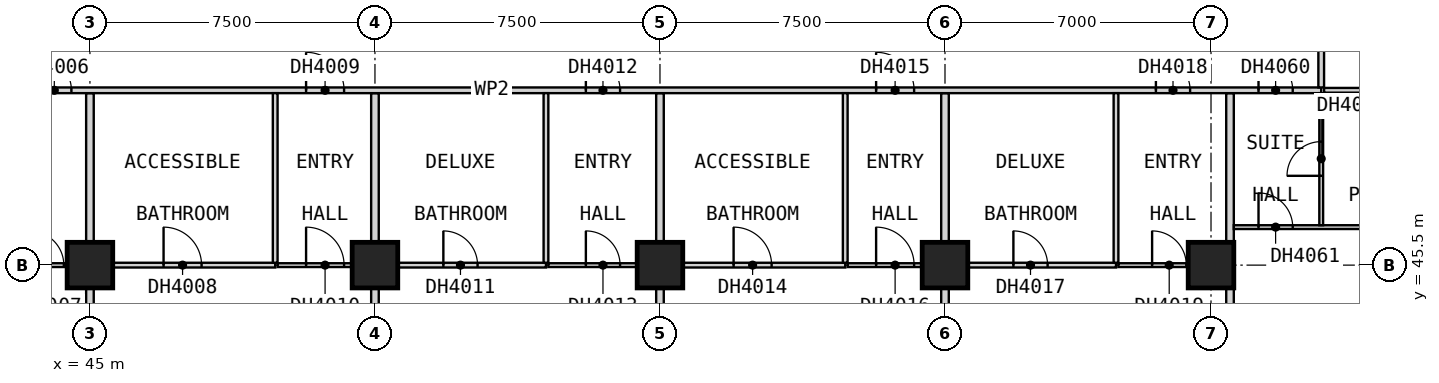
"""IFC4 building model, lengths in metres.
Left out: names, types, materials, properties, quantities, classifications, styles, units other than length and angle.
Written with IfcOpenShell. Run it as: python <this file> out.ifc"""

import sys

from ifc_helpers import new_model, si_unit, direction, frame, frame_2d, origin, origin_2d, place, context, subcontext, project, spatial, rectangle, extrude, element, fill, save


model = new_model("IFC4")
c1 = context("Model", 3, precision=1e-05, world=origin(), true_north=direction((0.0, 1.0)))
c2 = subcontext(c1, "Body", "Model", "MODEL_VIEW")
j1 = project(units=[si_unit("LENGTHUNIT", "METRE"), si_unit("PLANEANGLEUNIT", "RADIAN")], contexts=[c1])
p1 = place(None, origin())
s1 = spatial("IfcSite", under=j1, at=p1, CompositionType="ELEMENT")
p2 = place(p1, origin())
s2 = spatial("IfcBuilding", under=s1, at=p2, CompositionType="ELEMENT")
p3 = place(p2, frame((0.0, 0.0, 44.8)))
s3 = spatial("IfcBuildingStorey", under=s2, at=p3, CompositionType="ELEMENT", Elevation=44.8)
for number, where, z_axis, x_axis in (
    (1, (45.0, 45.5, 0.0), (0.0, 0.0, 1.0), (1.0, 0.0, 0.0)),
    (2, (52.5, 45.5, 0.0), (0.0, 0.0, 1.0), (1.0, 0.0, 0.0)),
    (3, (60.0, 45.5, 0.0), (0.0, 0.0, 1.0), (1.0, 0.0, 0.0)),
    (4, (67.5, 45.5, 0.0), (0.0, 0.0, 1.0), (1.0, 0.0, 0.0)),
    (5, (74.5, 45.5, 0.0), (0.0, 0.0, 1.0), (1.0, 0.0, 0.0)),
):
    element("IfcColumn", number, at=place(p3, frame(where, z_axis=z_axis, x_axis=x_axis)), inside=s3, PredefinedType="COLUMN", context=c2, shape_type="SweptSolid", body=[
        extrude(rectangle(XDim=1.2, YDim=1.2, at=origin_2d()), origin(), (0.0, 0.0, 1.0), 3.6),
    ])
for number, where, z_axis, x_axis in (
    (6, (45.0, 37.5, 0.0), (0.0, 0.0, 1.0), (0.0, 1.0, 0.0)),
    (7, (52.5, 37.5, 0.0), (0.0, 0.0, 1.0), (0.0, 1.0, 0.0)),
    (8, (60.0, 37.5, 0.0), (0.0, 0.0, 1.0), (0.0, 1.0, 0.0)),
    (9, (67.5, 37.5, 0.0), (0.0, 0.0, 1.0), (0.0, 1.0, 0.0)),
):
    element("IfcWall", number, at=place(p3, frame(where, z_axis=z_axis, x_axis=x_axis)), inside=s3, PredefinedType="PARTITIONING", context=c2, shape_type="SweptSolid", body=[
        extrude(rectangle(XDim=12.525, YDim=0.2, at=frame_2d((6.262, 0.0))), origin(), (0.0, 0.0, 1.0), 3.35),
    ])
p4 = place(p3, frame((75.0, 38.31, 0.0), z_axis=(0.0, 0.0, 1.0), x_axis=(0.0, 1.0, 0.0)))
e10 = element("IfcWall", 10, at=p4, inside=s3, PredefinedType="PARTITIONING", context=c2, shape_type="SweptSolid", body=[
    extrude(rectangle(XDim=11.715, YDim=0.2, at=frame_2d((5.857, 0.0))), origin(), (0.0, 0.0, 1.0), 3.35),
])
p5 = place(p3, frame((33.75, 50.1, 0.0), z_axis=(0.0, 0.0, 1.0), x_axis=(1.0, 0.0, 0.0)))
e11 = element("IfcWall", 11, at=p5, inside=s3, PredefinedType="PARTITIONING", context=c2, shape_type="SweptSolid", body=[
    extrude(rectangle(XDim=43.65, YDim=0.15, at=frame_2d((21.825, 0.0))), origin(), (0.0, 0.0, 1.0), 3.35),
])
p6 = place(p5, frame((5.175, 0.0, 0.0)))
e12 = element("IfcOpeningElement", 12, at=p6, cuts=e11, PredefinedType="OPENING", context=c2, shape_type="SweptSolid", body=[
    extrude(rectangle(XDim=0.9, YDim=2.1, at=frame_2d((0.45, 1.05))), frame((0.0, 0.085, 0.0), z_axis=(0.0, -1.0, 0.0), x_axis=(1.0, 0.0, 0.0)), (0.0, 0.0, 1.0), 0.17),
])
p7 = place(p5, frame((9.863, 0.0, 0.0)))
e13 = element("IfcOpeningElement", 13, at=p7, cuts=e11, PredefinedType="OPENING", context=c2, shape_type="SweptSolid", body=[
    extrude(rectangle(XDim=0.9, YDim=2.1, at=frame_2d((0.45, 1.05))), frame((0.0, 0.085, 0.0), z_axis=(0.0, -1.0, 0.0), x_axis=(1.0, 0.0, 0.0)), (0.0, 0.0, 1.0), 0.17),
])
p8 = place(p5, frame((16.938, 0.0, 0.0)))
e14 = element("IfcOpeningElement", 14, at=p8, cuts=e11, PredefinedType="OPENING", context=c2, shape_type="SweptSolid", body=[
    extrude(rectangle(XDim=1.0, YDim=2.1, at=frame_2d((0.5, 1.05))), frame((0.0, 0.085, 0.0), z_axis=(0.0, -1.0, 0.0), x_axis=(1.0, 0.0, 0.0)), (0.0, 0.0, 1.0), 0.17),
])
p9 = place(p5, frame((24.3, 0.0, 0.0)))
e15 = element("IfcOpeningElement", 15, at=p9, cuts=e11, PredefinedType="OPENING", context=c2, shape_type="SweptSolid", body=[
    extrude(rectangle(XDim=0.9, YDim=2.1, at=frame_2d((0.45, 1.05))), frame((0.0, 0.085, 0.0), z_axis=(0.0, -1.0, 0.0), x_axis=(1.0, 0.0, 0.0)), (0.0, 0.0, 1.0), 0.17),
])
p10 = place(p5, frame((31.938, 0.0, 0.0)))
e16 = element("IfcOpeningElement", 16, at=p10, cuts=e11, PredefinedType="OPENING", context=c2, shape_type="SweptSolid", body=[
    extrude(rectangle(XDim=1.0, YDim=2.1, at=frame_2d((0.5, 1.05))), frame((0.0, 0.085, 0.0), z_axis=(0.0, -1.0, 0.0), x_axis=(1.0, 0.0, 0.0)), (0.0, 0.0, 1.0), 0.17),
])
p11 = place(p5, frame((39.3, 0.0, 0.0)))
e17 = element("IfcOpeningElement", 17, at=p11, cuts=e11, PredefinedType="OPENING", context=c2, shape_type="SweptSolid", body=[
    extrude(rectangle(XDim=0.9, YDim=2.1, at=frame_2d((0.45, 1.05))), frame((0.0, 0.085, 0.0), z_axis=(0.0, -1.0, 0.0), x_axis=(1.0, 0.0, 0.0)), (0.0, 0.0, 1.0), 0.17),
])
p12 = place(p5, frame((42.0, 0.0, 0.0)))
e18 = element("IfcOpeningElement", 18, at=p12, cuts=e11, PredefinedType="OPENING", context=c2, shape_type="SweptSolid", body=[
    extrude(rectangle(XDim=0.9, YDim=2.1, at=frame_2d((0.45, 1.05))), frame((0.0, 0.085, 0.0), z_axis=(0.0, -1.0, 0.0), x_axis=(1.0, 0.0, 0.0)), (0.0, 0.0, 1.0), 0.17),
])
p13 = place(p3, frame((77.4, 50.175, 0.0), z_axis=(0.0, 0.0, 1.0), x_axis=(0.0, 1.0, 0.0)))
e19 = element("IfcWall", 19, at=p13, inside=s3, PredefinedType="PARTITIONING", context=c2, shape_type="SweptSolid", body=[
    extrude(rectangle(XDim=42.15, YDim=0.15, at=frame_2d((21.075, 0.0))), origin(), (0.0, 0.0, 1.0), 3.35),
])
p14 = place(p13, frame((8.012, 0.0, 0.0)))
e20 = element("IfcOpeningElement", 20, at=p14, cuts=e19, PredefinedType="OPENING", context=c2, shape_type="SweptSolid", body=[
    extrude(rectangle(XDim=1.0, YDim=2.1, at=frame_2d((0.5, 1.05))), frame((0.0, 0.085, 0.0), z_axis=(0.0, -1.0, 0.0), x_axis=(1.0, 0.0, 0.0)), (0.0, 0.0, 1.0), 0.17),
])
p15 = place(p13, frame((12.188, 0.0, 0.0)))
e21 = element("IfcOpeningElement", 21, at=p15, cuts=e19, PredefinedType="OPENING", context=c2, shape_type="SweptSolid", body=[
    extrude(rectangle(XDim=0.9, YDim=2.1, at=frame_2d((0.45, 1.05))), frame((0.0, 0.085, 0.0), z_axis=(0.0, -1.0, 0.0), x_axis=(1.0, 0.0, 0.0)), (0.0, 0.0, 1.0), 0.17),
])
p16 = place(p13, frame((19.125, 0.0, 0.0)))
e22 = element("IfcOpeningElement", 22, at=p16, cuts=e19, PredefinedType="OPENING", context=c2, shape_type="SweptSolid", body=[
    extrude(rectangle(XDim=0.9, YDim=2.1, at=frame_2d((0.45, 1.05))), frame((0.0, 0.085, 0.0), z_axis=(0.0, -1.0, 0.0), x_axis=(1.0, 0.0, 0.0)), (0.0, 0.0, 1.0), 0.17),
])
p17 = place(p13, frame((26.625, 0.0, 0.0)))
e23 = element("IfcOpeningElement", 23, at=p17, cuts=e19, PredefinedType="OPENING", context=c2, shape_type="SweptSolid", body=[
    extrude(rectangle(XDim=0.9, YDim=2.1, at=frame_2d((0.45, 1.05))), frame((0.0, 0.085, 0.0), z_axis=(0.0, -1.0, 0.0), x_axis=(1.0, 0.0, 0.0)), (0.0, 0.0, 1.0), 0.17),
])
p18 = place(p13, frame((30.938, 0.0, 0.0)))
e24 = element("IfcOpeningElement", 24, at=p18, cuts=e19, PredefinedType="OPENING", context=c2, shape_type="SweptSolid", body=[
    extrude(rectangle(XDim=0.9, YDim=2.1, at=frame_2d((0.45, 1.05))), frame((0.0, 0.085, 0.0), z_axis=(0.0, -1.0, 0.0), x_axis=(1.0, 0.0, 0.0)), (0.0, 0.0, 1.0), 0.17),
])
p19 = place(p13, frame((34.688, 0.0, 0.0)))
e25 = element("IfcOpeningElement", 25, at=p19, cuts=e19, PredefinedType="OPENING", context=c2, shape_type="SweptSolid", body=[
    extrude(rectangle(XDim=0.9, YDim=2.1, at=frame_2d((0.45, 1.05))), frame((0.0, 0.085, 0.0), z_axis=(0.0, -1.0, 0.0), x_axis=(1.0, 0.0, 0.0)), (0.0, 0.0, 1.0), 0.17),
])
p20 = place(p13, frame((38.438, 0.0, 0.0)))
e26 = element("IfcOpeningElement", 26, at=p20, cuts=e19, PredefinedType="OPENING", context=c2, shape_type="SweptSolid", body=[
    extrude(rectangle(XDim=0.9, YDim=2.1, at=frame_2d((0.45, 1.05))), frame((0.0, 0.085, 0.0), z_axis=(0.0, -1.0, 0.0), x_axis=(1.0, 0.0, 0.0)), (0.0, 0.0, 1.0), 0.17),
])
p21 = place(p3, frame((43.188, 45.5, 0.0), z_axis=(0.0, 0.0, 1.0), x_axis=(1.0, 0.0, 0.0)))
e27 = element("IfcWall", 27, at=p21, inside=s3, PredefinedType="PARTITIONING", context=c2, shape_type="SweptSolid", body=[
    extrude(rectangle(XDim=1.712, YDim=0.1, at=frame_2d((0.856, 0.0))), origin(), (0.0, 0.0, 1.0), 3.35),
])
p22 = place(p21, frame((0.225, 0.0, 0.0)))
e28 = element("IfcOpeningElement", 28, at=p22, cuts=e27, PredefinedType="OPENING", context=c2, shape_type="SweptSolid", body=[
    extrude(rectangle(XDim=0.9, YDim=2.1, at=frame_2d((0.45, 1.05))), frame((0.0, 0.06, 0.0), z_axis=(0.0, -1.0, 0.0), x_axis=(1.0, 0.0, 0.0)), (0.0, 0.0, 1.0), 0.12),
])
p23 = place(p3, frame((49.938, 45.5, 0.0), z_axis=(0.0, 0.0, 1.0), x_axis=(1.0, 0.0, 0.0)))
e29 = element("IfcWall", 29, at=p23, inside=s3, PredefinedType="PARTITIONING", context=c2, shape_type="SweptSolid", body=[
    extrude(rectangle(XDim=2.462, YDim=0.1, at=frame_2d((1.231, 0.0))), origin(), (0.0, 0.0, 1.0), 3.35),
])
p24 = place(p23, frame((0.75, 0.0, 0.0)))
e30 = element("IfcOpeningElement", 30, at=p24, cuts=e29, PredefinedType="OPENING", context=c2, shape_type="SweptSolid", body=[
    extrude(rectangle(XDim=1.0, YDim=2.1, at=frame_2d((0.5, 1.05))), frame((0.0, 0.06, 0.0), z_axis=(0.0, -1.0, 0.0), x_axis=(1.0, 0.0, 0.0)), (0.0, 0.0, 1.0), 0.12),
])
p25 = place(p3, frame((57.062, 45.5, 0.0), z_axis=(0.0, 0.0, 1.0), x_axis=(1.0, 0.0, 0.0)))
e31 = element("IfcWall", 31, at=p25, inside=s3, PredefinedType="PARTITIONING", context=c2, shape_type="SweptSolid", body=[
    extrude(rectangle(XDim=2.837, YDim=0.1, at=frame_2d((1.419, 0.0))), origin(), (0.0, 0.0, 1.0), 3.35),
])
p26 = place(p25, frame((0.988, 0.0, 0.0)))
e32 = element("IfcOpeningElement", 32, at=p26, cuts=e31, PredefinedType="OPENING", context=c2, shape_type="SweptSolid", body=[
    extrude(rectangle(XDim=0.9, YDim=2.1, at=frame_2d((0.45, 1.05))), frame((0.0, 0.06, 0.0), z_axis=(0.0, -1.0, 0.0), x_axis=(1.0, 0.0, 0.0)), (0.0, 0.0, 1.0), 0.12),
])
p27 = place(p3, frame((64.938, 45.5, 0.0), z_axis=(0.0, 0.0, 1.0), x_axis=(1.0, 0.0, 0.0)))
e33 = element("IfcWall", 33, at=p27, inside=s3, PredefinedType="PARTITIONING", context=c2, shape_type="SweptSolid", body=[
    extrude(rectangle(XDim=2.462, YDim=0.1, at=frame_2d((1.231, 0.0))), origin(), (0.0, 0.0, 1.0), 3.35),
])
p28 = place(p27, frame((0.75, 0.0, 0.0)))
e34 = element("IfcOpeningElement", 34, at=p28, cuts=e33, PredefinedType="OPENING", context=c2, shape_type="SweptSolid", body=[
    extrude(rectangle(XDim=1.0, YDim=2.1, at=frame_2d((0.5, 1.05))), frame((0.0, 0.06, 0.0), z_axis=(0.0, -1.0, 0.0), x_axis=(1.0, 0.0, 0.0)), (0.0, 0.0, 1.0), 0.12),
])
p29 = place(p3, frame((72.062, 45.5, 0.0), z_axis=(0.0, 0.0, 1.0), x_axis=(1.0, 0.0, 0.0)))
e35 = element("IfcWall", 35, at=p29, inside=s3, PredefinedType="PARTITIONING", context=c2, shape_type="SweptSolid", body=[
    extrude(rectangle(XDim=2.837, YDim=0.1, at=frame_2d((1.419, 0.0))), origin(), (0.0, 0.0, 1.0), 3.35),
])
p30 = place(p29, frame((0.887, 0.0, 0.0)))
e36 = element("IfcOpeningElement", 36, at=p30, cuts=e35, PredefinedType="OPENING", context=c2, shape_type="SweptSolid", body=[
    extrude(rectangle(XDim=0.9, YDim=2.1, at=frame_2d((0.45, 1.05))), frame((0.0, 0.06, 0.0), z_axis=(0.0, -1.0, 0.0), x_axis=(1.0, 0.0, 0.0)), (0.0, 0.0, 1.0), 0.12),
])
p31 = place(p3, frame((75.1, 46.5, 0.0), z_axis=(0.0, 0.0, 1.0), x_axis=(1.0, 0.0, 0.0)))
e37 = element("IfcWall", 37, at=p31, inside=s3, PredefinedType="PARTITIONING", context=c2, shape_type="SweptSolid", body=[
    extrude(rectangle(XDim=7.35, YDim=0.1, at=frame_2d((3.675, 0.0))), origin(), (0.0, 0.0, 1.0), 3.35),
])
p32 = place(p31, frame((0.65, 0.0, 0.0)))
e38 = element("IfcOpeningElement", 38, at=p32, cuts=e37, PredefinedType="OPENING", context=c2, shape_type="SweptSolid", body=[
    extrude(rectangle(XDim=0.9, YDim=2.1, at=frame_2d((0.45, 1.05))), frame((0.0, 0.06, 0.0), z_axis=(0.0, -1.0, 0.0), x_axis=(1.0, 0.0, 0.0)), (0.0, 0.0, 1.0), 0.12),
])
p33 = place(p3, frame((77.4, 46.55, 0.0), z_axis=(0.0, 0.0, 1.0), x_axis=(0.0, 1.0, 0.0)))
e39 = element("IfcWall", 39, at=p33, inside=s3, PredefinedType="PARTITIONING", context=c2, shape_type="SweptSolid", body=[
    extrude(rectangle(XDim=3.475, YDim=0.1, at=frame_2d((1.737, 0.0))), origin(), (0.0, 0.0, 1.0), 3.35),
])
p34 = place(p33, frame((1.3, 0.0, 0.0)))
e40 = element("IfcOpeningElement", 40, at=p34, cuts=e39, PredefinedType="OPENING", context=c2, shape_type="SweptSolid", body=[
    extrude(rectangle(XDim=0.9, YDim=2.1, at=frame_2d((0.45, 1.05))), frame((0.0, 0.06, 0.0), z_axis=(0.0, -1.0, 0.0), x_axis=(1.0, 0.0, 0.0)), (0.0, 0.0, 1.0), 0.12),
])
p35 = place(p3, frame((45.1, 45.5, 0.0), z_axis=(0.0, 0.0, 1.0), x_axis=(1.0, 0.0, 0.0)))
e41 = element("IfcWall", 41, at=p35, inside=s3, PredefinedType="PARTITIONING", context=c2, shape_type="SweptSolid", body=[
    extrude(rectangle(XDim=4.775, YDim=0.125, at=frame_2d((2.387, 0.0))), origin(), (0.0, 0.0, 1.0), 3.35),
])
p36 = place(p35, frame((1.837, 0.0, 0.0)))
e42 = element("IfcOpeningElement", 42, at=p36, cuts=e41, PredefinedType="OPENING", context=c2, shape_type="SweptSolid", body=[
    extrude(rectangle(XDim=1.0, YDim=2.1, at=frame_2d((0.5, 1.05))), frame((0.0, 0.073, 0.0), z_axis=(0.0, -1.0, 0.0), x_axis=(1.0, 0.0, 0.0)), (0.0, 0.0, 1.0), 0.145),
])
p37 = place(p3, frame((52.6, 45.5, 0.0), z_axis=(0.0, 0.0, 1.0), x_axis=(1.0, 0.0, 0.0)))
e43 = element("IfcWall", 43, at=p37, inside=s3, PredefinedType="PARTITIONING", context=c2, shape_type="SweptSolid", body=[
    extrude(rectangle(XDim=4.4, YDim=0.125, at=frame_2d((2.2, 0.0))), origin(), (0.0, 0.0, 1.0), 3.35),
])
p38 = place(p37, frame((1.7, 0.0, 0.0)))
e44 = element("IfcOpeningElement", 44, at=p38, cuts=e43, PredefinedType="OPENING", context=c2, shape_type="SweptSolid", body=[
    extrude(rectangle(XDim=0.9, YDim=2.1, at=frame_2d((0.45, 1.05))), frame((0.0, 0.073, 0.0), z_axis=(0.0, -1.0, 0.0), x_axis=(1.0, 0.0, 0.0)), (0.0, 0.0, 1.0), 0.145),
])
p39 = place(p3, frame((60.1, 45.5, 0.0), z_axis=(0.0, 0.0, 1.0), x_axis=(1.0, 0.0, 0.0)))
e45 = element("IfcWall", 45, at=p39, inside=s3, PredefinedType="PARTITIONING", context=c2, shape_type="SweptSolid", body=[
    extrude(rectangle(XDim=4.775, YDim=0.125, at=frame_2d((2.387, 0.0))), origin(), (0.0, 0.0, 1.0), 3.35),
])
p40 = place(p39, frame((1.837, 0.0, 0.0)))
e46 = element("IfcOpeningElement", 46, at=p40, cuts=e45, PredefinedType="OPENING", context=c2, shape_type="SweptSolid", body=[
    extrude(rectangle(XDim=1.0, YDim=2.1, at=frame_2d((0.5, 1.05))), frame((0.0, 0.073, 0.0), z_axis=(0.0, -1.0, 0.0), x_axis=(1.0, 0.0, 0.0)), (0.0, 0.0, 1.0), 0.145),
])
p41 = place(p3, frame((67.6, 45.5, 0.0), z_axis=(0.0, 0.0, 1.0), x_axis=(1.0, 0.0, 0.0)))
e47 = element("IfcWall", 47, at=p41, inside=s3, PredefinedType="PARTITIONING", context=c2, shape_type="SweptSolid", body=[
    extrude(rectangle(XDim=4.4, YDim=0.125, at=frame_2d((2.2, 0.0))), origin(), (0.0, 0.0, 1.0), 3.35),
])
p42 = place(p41, frame((1.7, 0.0, 0.0)))
e48 = element("IfcOpeningElement", 48, at=p42, cuts=e47, PredefinedType="OPENING", context=c2, shape_type="SweptSolid", body=[
    extrude(rectangle(XDim=0.9, YDim=2.1, at=frame_2d((0.45, 1.05))), frame((0.0, 0.073, 0.0), z_axis=(0.0, -1.0, 0.0), x_axis=(1.0, 0.0, 0.0)), (0.0, 0.0, 1.0), 0.145),
])
p43 = place(p3, frame((77.475, 50.1, 0.0), z_axis=(0.0, 0.0, 1.0), x_axis=(1.0, 0.0, 0.0)))
e49 = element("IfcWall", 49, at=p43, inside=s3, PredefinedType="PARTITIONING", context=c2, shape_type="SweptSolid", body=[
    extrude(rectangle(XDim=5.025, YDim=0.125, at=frame_2d((2.512, 0.0))), origin(), (0.0, 0.0, 1.0), 3.35),
])
for number, where, z_axis, x_axis in (
    (50, (49.875, 45.562, 0.0), (0.0, 0.0, 1.0), (0.0, 1.0, 0.0)),
    (51, (57.0, 45.562, 0.0), (0.0, 0.0, 1.0), (0.0, 1.0, 0.0)),
    (52, (64.875, 45.562, 0.0), (0.0, 0.0, 1.0), (0.0, 1.0, 0.0)),
    (53, (72.0, 45.562, 0.0), (0.0, 0.0, 1.0), (0.0, 1.0, 0.0)),
):
    element("IfcWall", number, at=place(p3, frame(where, z_axis=z_axis, x_axis=x_axis)), inside=s3, PredefinedType="PARTITIONING", context=c2, shape_type="SweptSolid", body=[
        extrude(rectangle(XDim=4.462, YDim=0.125, at=frame_2d((2.231, 0.0))), origin(), (0.0, 0.0, 1.0), 3.35),
    ])
p44 = place(p7, origin())
e54 = element("IfcDoor", 54, at=p44, inside=s3, OperationType="SINGLE_SWING_RIGHT", PredefinedType="DOOR", context=c2, shape_type="SweptSolid", body=[
    extrude(rectangle(XDim=0.9, YDim=2.1, at=frame_2d((0.45, 1.05))), frame((0.0, 0.025, 0.0), z_axis=(0.0, -1.0, 0.0), x_axis=(1.0, 0.0, 0.0)), (0.0, 0.0, 1.0), 0.05),
])
fill(e13, e54)
p45 = place(p22, origin())
e55 = element("IfcDoor", 55, at=p45, inside=s3, OperationType="SINGLE_SWING_LEFT", PredefinedType="DOOR", context=c2, shape_type="SweptSolid", body=[
    extrude(rectangle(XDim=0.9, YDim=2.1, at=frame_2d((0.45, 1.05))), frame((0.0, 0.025, 0.0), z_axis=(0.0, -1.0, 0.0), x_axis=(1.0, 0.0, 0.0)), (0.0, 0.0, 1.0), 0.05),
])
fill(e28, e55)
p46 = place(p36, origin())
e56 = element("IfcDoor", 56, at=p46, inside=s3, OperationType="SINGLE_SWING_LEFT", PredefinedType="DOOR", context=c2, shape_type="SweptSolid", body=[
    extrude(rectangle(XDim=1.0, YDim=2.1, at=frame_2d((0.5, 1.05))), frame((0.0, 0.025, 0.0), z_axis=(0.0, -1.0, 0.0), x_axis=(1.0, 0.0, 0.0)), (0.0, 0.0, 1.0), 0.05),
])
fill(e42, e56)
p47 = place(p8, origin())
e57 = element("IfcDoor", 57, at=p47, inside=s3, OperationType="SINGLE_SWING_RIGHT", PredefinedType="DOOR", context=c2, shape_type="SweptSolid", body=[
    extrude(rectangle(XDim=1.0, YDim=2.1, at=frame_2d((0.5, 1.05))), frame((0.0, 0.025, 0.0), z_axis=(0.0, -1.0, 0.0), x_axis=(1.0, 0.0, 0.0)), (0.0, 0.0, 1.0), 0.05),
])
fill(e14, e57)
p48 = place(p24, origin())
e58 = element("IfcDoor", 58, at=p48, inside=s3, OperationType="SINGLE_SWING_LEFT", PredefinedType="DOOR", context=c2, shape_type="SweptSolid", body=[
    extrude(rectangle(XDim=1.0, YDim=2.1, at=frame_2d((0.5, 1.05))), frame((0.0, 0.025, 0.0), z_axis=(0.0, -1.0, 0.0), x_axis=(1.0, 0.0, 0.0)), (0.0, 0.0, 1.0), 0.05),
])
fill(e30, e58)
p49 = place(p38, origin())
e59 = element("IfcDoor", 59, at=p49, inside=s3, OperationType="SINGLE_SWING_LEFT", PredefinedType="DOOR", context=c2, shape_type="SweptSolid", body=[
    extrude(rectangle(XDim=0.9, YDim=2.1, at=frame_2d((0.45, 1.05))), frame((0.0, 0.025, 0.0), z_axis=(0.0, -1.0, 0.0), x_axis=(1.0, 0.0, 0.0)), (0.0, 0.0, 1.0), 0.05),
])
fill(e44, e59)
p50 = place(p9, origin())
e60 = element("IfcDoor", 60, at=p50, inside=s3, OperationType="SINGLE_SWING_RIGHT", PredefinedType="DOOR", context=c2, shape_type="SweptSolid", body=[
    extrude(rectangle(XDim=0.9, YDim=2.1, at=frame_2d((0.45, 1.05))), frame((0.0, 0.025, 0.0), z_axis=(0.0, -1.0, 0.0), x_axis=(1.0, 0.0, 0.0)), (0.0, 0.0, 1.0), 0.05),
])
fill(e15, e60)
p51 = place(p26, origin())
e61 = element("IfcDoor", 61, at=p51, inside=s3, OperationType="SINGLE_SWING_LEFT", PredefinedType="DOOR", context=c2, shape_type="SweptSolid", body=[
    extrude(rectangle(XDim=0.9, YDim=2.1, at=frame_2d((0.45, 1.05))), frame((0.0, 0.025, 0.0), z_axis=(0.0, -1.0, 0.0), x_axis=(1.0, 0.0, 0.0)), (0.0, 0.0, 1.0), 0.05),
])
fill(e32, e61)
p52 = place(p40, origin())
e62 = element("IfcDoor", 62, at=p52, inside=s3, OperationType="SINGLE_SWING_LEFT", PredefinedType="DOOR", context=c2, shape_type="SweptSolid", body=[
    extrude(rectangle(XDim=1.0, YDim=2.1, at=frame_2d((0.5, 1.05))), frame((0.0, 0.025, 0.0), z_axis=(0.0, -1.0, 0.0), x_axis=(1.0, 0.0, 0.0)), (0.0, 0.0, 1.0), 0.05),
])
fill(e46, e62)
p53 = place(p10, origin())
e63 = element("IfcDoor", 63, at=p53, inside=s3, OperationType="SINGLE_SWING_RIGHT", PredefinedType="DOOR", context=c2, shape_type="SweptSolid", body=[
    extrude(rectangle(XDim=1.0, YDim=2.1, at=frame_2d((0.5, 1.05))), frame((0.0, 0.025, 0.0), z_axis=(0.0, -1.0, 0.0), x_axis=(1.0, 0.0, 0.0)), (0.0, 0.0, 1.0), 0.05),
])
fill(e16, e63)
p54 = place(p28, origin())
e64 = element("IfcDoor", 64, at=p54, inside=s3, OperationType="SINGLE_SWING_LEFT", PredefinedType="DOOR", context=c2, shape_type="SweptSolid", body=[
    extrude(rectangle(XDim=1.0, YDim=2.1, at=frame_2d((0.5, 1.05))), frame((0.0, 0.025, 0.0), z_axis=(0.0, -1.0, 0.0), x_axis=(1.0, 0.0, 0.0)), (0.0, 0.0, 1.0), 0.05),
])
fill(e34, e64)
p55 = place(p42, origin())
e65 = element("IfcDoor", 65, at=p55, inside=s3, OperationType="SINGLE_SWING_LEFT", PredefinedType="DOOR", context=c2, shape_type="SweptSolid", body=[
    extrude(rectangle(XDim=0.9, YDim=2.1, at=frame_2d((0.45, 1.05))), frame((0.0, 0.025, 0.0), z_axis=(0.0, -1.0, 0.0), x_axis=(1.0, 0.0, 0.0)), (0.0, 0.0, 1.0), 0.05),
])
fill(e48, e65)
p56 = place(p11, origin())
e66 = element("IfcDoor", 66, at=p56, inside=s3, OperationType="SINGLE_SWING_RIGHT", PredefinedType="DOOR", context=c2, shape_type="SweptSolid", body=[
    extrude(rectangle(XDim=0.9, YDim=2.1, at=frame_2d((0.45, 1.05))), frame((0.0, 0.025, 0.0), z_axis=(0.0, -1.0, 0.0), x_axis=(1.0, 0.0, 0.0)), (0.0, 0.0, 1.0), 0.05),
])
fill(e17, e66)
p57 = place(p30, origin())
e67 = element("IfcDoor", 67, at=p57, inside=s3, OperationType="SINGLE_SWING_LEFT", PredefinedType="DOOR", context=c2, shape_type="SweptSolid", body=[
    extrude(rectangle(XDim=0.9, YDim=2.1, at=frame_2d((0.45, 1.05))), frame((0.0, 0.025, 0.0), z_axis=(0.0, -1.0, 0.0), x_axis=(1.0, 0.0, 0.0)), (0.0, 0.0, 1.0), 0.05),
])
fill(e36, e67)
p58 = place(p12, origin())
e68 = element("IfcDoor", 68, at=p58, inside=s3, OperationType="SINGLE_SWING_LEFT", PredefinedType="DOOR", context=c2, shape_type="SweptSolid", body=[
    extrude(rectangle(XDim=0.9, YDim=2.1, at=frame_2d((0.45, 1.05))), frame((0.0, 0.025, 0.0), z_axis=(0.0, -1.0, 0.0), x_axis=(1.0, 0.0, 0.0)), (0.0, 0.0, 1.0), 0.05),
])
fill(e18, e68)
p59 = place(p32, origin())
e69 = element("IfcDoor", 69, at=p59, inside=s3, OperationType="SINGLE_SWING_RIGHT", PredefinedType="DOOR", context=c2, shape_type="SweptSolid", body=[
    extrude(rectangle(XDim=0.9, YDim=2.1, at=frame_2d((0.45, 1.05))), frame((0.0, 0.025, 0.0), z_axis=(0.0, -1.0, 0.0), x_axis=(1.0, 0.0, 0.0)), (0.0, 0.0, 1.0), 0.05),
])
fill(e38, e69)
p60 = place(p34, origin())
e70 = element("IfcDoor", 70, at=p60, inside=s3, OperationType="SINGLE_SWING_RIGHT", PredefinedType="DOOR", context=c2, shape_type="SweptSolid", body=[
    extrude(rectangle(XDim=0.9, YDim=2.1, at=frame_2d((0.45, 1.05))), frame((0.0, 0.025, 0.0), z_axis=(0.0, -1.0, 0.0), x_axis=(1.0, 0.0, 0.0)), (0.0, 0.0, 1.0), 0.05),
])
fill(e40, e70)
save(model, sys.argv[1])
